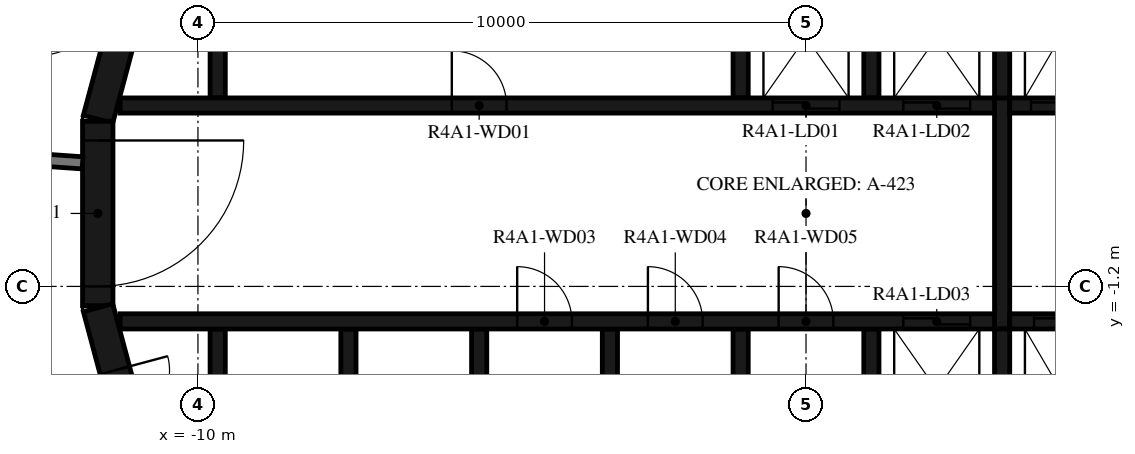
"""IFC4 building model, lengths in metres.
Left out: names, types, materials, properties, quantities, classifications, styles, units other than length and angle.
Written with IfcOpenShell. Run it as: python <this file> out.ifc"""

import sys

from ifc_helpers import new_model, si_unit, direction, frame, frame_2d, origin, place, context, subcontext, project, spatial, polyline, rectangle, outline, extrude, element, fill, save


model = new_model("IFC4")
c1 = context("Model", 3, precision=1e-05, world=origin(), true_north=direction((0.0, 1.0)))
c2 = subcontext(c1, "Body", "Model", "MODEL_VIEW")
j1 = project(units=[si_unit("LENGTHUNIT", "METRE"), si_unit("PLANEANGLEUNIT", "RADIAN")], contexts=[c1])
p1 = place(None, origin())
s1 = spatial("IfcSite", under=j1, at=p1, CompositionType="ELEMENT")
p2 = place(p1, origin())
s2 = spatial("IfcBuilding", under=s1, at=p2, CompositionType="ELEMENT")
p3 = place(p2, frame((0.0, 0.0, 155.2)))
s3 = spatial("IfcBuildingStorey", under=s2, at=p3, CompositionType="ELEMENT", Elevation=155.2)
p4 = place(p3, frame((-10.858, 4.479, 0.0), z_axis=(0.0, 0.0, 1.0), x_axis=(-0.258734743916, -0.965948410781, 0.0)))
e1 = element("IfcWall", 1, at=p4, inside=s3, PredefinedType="SHEAR", context=c2, shape_type="SweptSolid", body=[
    extrude(rectangle(XDim=3.033, YDim=0.5, at=frame_2d((1.516, 0.0))), origin(), (0.0, 0.0, 1.0), 3.12),
])
p5 = place(p3, frame((-11.647, 1.516, 0.0), z_axis=(0.0, 0.0, 1.0), x_axis=(0.0, -1.0, 0.0)))
e2 = element("IfcWall", 2, at=p5, inside=s3, PredefinedType="SHEAR", context=c2, shape_type="SweptSolid", body=[
    extrude(rectangle(XDim=3.033, YDim=0.5, at=frame_2d((1.516, 0.0))), origin(), (0.0, 0.0, 1.0), 3.12),
])
p6 = place(p5, frame((0.316, 0.0, 0.0)))
e3 = element("IfcOpeningElement", 3, at=p6, cuts=e2, PredefinedType="OPENING", context=c2, shape_type="SweptSolid", body=[
    extrude(rectangle(XDim=2.4, YDim=2.1, at=frame_2d((1.2, 1.05))), frame((0.0, 0.26, 0.0), z_axis=(0.0, -1.0, 0.0), x_axis=(1.0, 0.0, 0.0)), (0.0, 0.0, 1.0), 0.52),
])
p7 = place(p3, frame((-11.643, -1.55, 0.0), z_axis=(0.0, 0.0, 1.0), x_axis=(0.258734743916, -0.965948410781, 0.0)))
e4 = element("IfcWall", 4, at=p7, inside=s3, PredefinedType="SHEAR", context=c2, shape_type="SweptSolid", body=[
    extrude(rectangle(XDim=3.033, YDim=0.5, at=frame_2d((1.516, 0.0))), origin(), (0.0, 0.0, 1.0), 3.12),
])
p8 = place(p7, frame((1.066, 0.0, 0.0)))
e5 = element("IfcOpeningElement", 5, at=p8, cuts=e4, PredefinedType="OPENING", context=c2, shape_type="SweptSolid", body=[
    extrude(rectangle(XDim=0.9, YDim=2.1, at=frame_2d((0.45, 1.05))), frame((0.0, 0.26, 0.0), z_axis=(0.0, -1.0, 0.0), x_axis=(1.0, 0.0, 0.0)), (0.0, 0.0, 1.0), 0.52),
])
p9 = place(p3, origin())
e6 = element("IfcWall", 6, at=p9, inside=s3, PredefinedType="SHEAR", context=c2, shape_type="SweptSolid", body=[
    extrude(outline(polyline([(-9.55, 4.8), (-1.2, 4.8), (-1.2, 1.9), (-0.95, 1.9), (-0.95, 4.8), (0.95, 4.8), (0.95, 1.9), (1.2, 1.9), (1.2, 4.8), (3.1, 4.8), (3.1, 1.9), (3.35, 1.9), (3.35, 4.8), (5.25, 4.8), (5.25, 1.9), (5.5, 1.9), (5.5, 4.8), (7.4, 4.8), (7.4, 1.9), (7.65, 1.9), (7.65, 4.8), (9.55, 4.8), (9.55, 1.9), (9.8, 1.9), (9.8, 4.8), (9.8, 5.05), (-9.8, 5.05), (-9.8, 4.8), (-9.8, 1.9), (-9.55, 1.9), (-9.55, 4.8)])), origin(), (0.0, 0.0, 1.0), 3.12),
])
p10 = place(p3, origin())
e7 = element("IfcWall", 7, at=p10, inside=s3, PredefinedType="SHEAR", context=c2, shape_type="SweptSolid", body=[
    extrude(outline(polyline([(9.8, -5.05), (9.8, -4.8), (9.8, -1.9), (9.55, -1.9), (9.55, -4.8), (7.65, -4.8), (7.65, -1.9), (7.4, -1.9), (7.4, -4.8), (5.5, -4.8), (5.5, -1.9), (5.25, -1.9), (5.25, -4.8), (3.35, -4.8), (3.35, -1.9), (3.1, -1.9), (3.1, -4.8), (1.2, -4.8), (1.2, -1.9), (0.95, -1.9), (0.95, -4.8), (-0.95, -4.8), (-0.95, -1.9), (-1.2, -1.9), (-1.2, -4.8), (-3.1, -4.8), (-3.1, -1.9), (-3.35, -1.9), (-3.35, -4.8), (-5.25, -4.8), (-5.25, -1.9), (-5.5, -1.9), (-5.5, -4.8), (-7.4, -4.8), (-7.4, -1.9), (-7.65, -1.9), (-7.65, -4.8), (-9.55, -4.8), (-9.55, -1.9), (-9.8, -1.9), (-9.8, -4.8), (-9.8, -5.05), (9.8, -5.05)])), origin(), (0.0, 0.0, 1.0), 3.12),
])
p11 = place(p3, frame((-11.28, 1.775, 0.0), z_axis=(0.0, 0.0, 1.0), x_axis=(1.0, 0.0, 0.0)))
e8 = element("IfcWall", 8, at=p11, inside=s3, PredefinedType="SHEAR", context=c2, shape_type="SweptSolid", body=[
    extrude(rectangle(XDim=14.38, YDim=0.25, at=frame_2d((7.19, 0.0))), origin(), (0.0, 0.0, 1.0), 3.12),
])
p12 = place(p11, frame((10.73, 0.0, 0.0)))
e9 = element("IfcOpeningElement", 9, at=p12, cuts=e8, PredefinedType="OPENING", context=c2, shape_type="SweptSolid", body=[
    extrude(rectangle(XDim=1.1, YDim=2.1, at=frame_2d((0.55, 1.05))), frame((0.0, 0.135, 0.0), z_axis=(0.0, -1.0, 0.0), x_axis=(1.0, 0.0, 0.0)), (0.0, 0.0, 1.0), 0.27),
])
p13 = place(p11, frame((12.88, 0.0, 0.0)))
e10 = element("IfcOpeningElement", 10, at=p13, cuts=e8, PredefinedType="OPENING", context=c2, shape_type="SweptSolid", body=[
    extrude(rectangle(XDim=1.1, YDim=2.1, at=frame_2d((0.55, 1.05))), frame((0.0, 0.135, 0.0), z_axis=(0.0, -1.0, 0.0), x_axis=(1.0, 0.0, 0.0)), (0.0, 0.0, 1.0), 0.27),
])
p14 = place(p11, frame((5.455, 0.0, 0.0)))
e11 = element("IfcOpeningElement", 11, at=p14, cuts=e8, PredefinedType="OPENING", context=c2, shape_type="SweptSolid", body=[
    extrude(rectangle(XDim=0.9, YDim=2.1, at=frame_2d((0.45, 1.05))), frame((0.0, 0.135, 0.0), z_axis=(0.0, -1.0, 0.0), x_axis=(1.0, 0.0, 0.0)), (0.0, 0.0, 1.0), 0.27),
])
p15 = place(p3, frame((3.35, 1.775, 0.0), z_axis=(0.0, 0.0, 1.0), x_axis=(1.0, 0.0, 0.0)))
e12 = element("IfcWall", 12, at=p15, inside=s3, PredefinedType="SHEAR", context=c2, shape_type="SweptSolid", body=[
    extrude(rectangle(XDim=7.93, YDim=0.25, at=frame_2d((3.965, 0.0))), origin(), (0.0, 0.0, 1.0), 3.12),
])
p16 = place(p15, frame((0.35, 0.0, 0.0)))
e13 = element("IfcOpeningElement", 13, at=p16, cuts=e12, PredefinedType="OPENING", context=c2, shape_type="SweptSolid", body=[
    extrude(rectangle(XDim=1.2, YDim=2.4, at=frame_2d((0.6, 1.2))), frame((0.0, 0.135, 0.0), z_axis=(0.0, -1.0, 0.0), x_axis=(1.0, 0.0, 0.0)), (0.0, 0.0, 1.0), 0.27),
])
p17 = place(p15, frame((2.5, 0.0, 0.0)))
e14 = element("IfcOpeningElement", 14, at=p17, cuts=e12, PredefinedType="OPENING", context=c2, shape_type="SweptSolid", body=[
    extrude(rectangle(XDim=1.2, YDim=2.4, at=frame_2d((0.6, 1.2))), frame((0.0, 0.135, 0.0), z_axis=(0.0, -1.0, 0.0), x_axis=(1.0, 0.0, 0.0)), (0.0, 0.0, 1.0), 0.27),
])
p18 = place(p15, frame((4.8, 0.0, 0.0)))
e15 = element("IfcOpeningElement", 15, at=p18, cuts=e12, PredefinedType="OPENING", context=c2, shape_type="SweptSolid", body=[
    extrude(rectangle(XDim=0.9, YDim=2.1, at=frame_2d((0.45, 1.05))), frame((0.0, 0.135, 0.0), z_axis=(0.0, -1.0, 0.0), x_axis=(1.0, 0.0, 0.0)), (0.0, 0.0, 1.0), 0.27),
])
p19 = place(p3, frame((-11.28, -1.775, 0.0), z_axis=(0.0, 0.0, 1.0), x_axis=(1.0, 0.0, 0.0)))
e16 = element("IfcWall", 16, at=p19, inside=s3, PredefinedType="SHEAR", context=c2, shape_type="SweptSolid", body=[
    extrude(rectangle(XDim=14.38, YDim=0.25, at=frame_2d((7.19, 0.0))), origin(), (0.0, 0.0, 1.0), 3.12),
])
p20 = place(p19, frame((12.88, 0.0, 0.0)))
e17 = element("IfcOpeningElement", 17, at=p20, cuts=e16, PredefinedType="OPENING", context=c2, shape_type="SweptSolid", body=[
    extrude(rectangle(XDim=1.1, YDim=2.1, at=frame_2d((0.55, 1.05))), frame((0.0, 0.135, 0.0), z_axis=(0.0, -1.0, 0.0), x_axis=(1.0, 0.0, 0.0)), (0.0, 0.0, 1.0), 0.27),
])
p21 = place(p19, frame((6.53, 0.0, 0.0)))
e18 = element("IfcOpeningElement", 18, at=p21, cuts=e16, PredefinedType="OPENING", context=c2, shape_type="SweptSolid", body=[
    extrude(rectangle(XDim=0.9, YDim=2.1, at=frame_2d((0.45, 1.05))), frame((0.0, 0.135, 0.0), z_axis=(0.0, -1.0, 0.0), x_axis=(1.0, 0.0, 0.0)), (0.0, 0.0, 1.0), 0.27),
])
p22 = place(p19, frame((8.68, 0.0, 0.0)))
e19 = element("IfcOpeningElement", 19, at=p22, cuts=e16, PredefinedType="OPENING", context=c2, shape_type="SweptSolid", body=[
    extrude(rectangle(XDim=0.9, YDim=2.1, at=frame_2d((0.45, 1.05))), frame((0.0, 0.135, 0.0), z_axis=(0.0, -1.0, 0.0), x_axis=(1.0, 0.0, 0.0)), (0.0, 0.0, 1.0), 0.27),
])
p23 = place(p19, frame((10.83, 0.0, 0.0)))
e20 = element("IfcOpeningElement", 20, at=p23, cuts=e16, PredefinedType="OPENING", context=c2, shape_type="SweptSolid", body=[
    extrude(rectangle(XDim=0.9, YDim=2.1, at=frame_2d((0.45, 1.05))), frame((0.0, 0.135, 0.0), z_axis=(0.0, -1.0, 0.0), x_axis=(1.0, 0.0, 0.0)), (0.0, 0.0, 1.0), 0.27),
])
p24 = place(p3, frame((3.35, -1.775, 0.0), z_axis=(0.0, 0.0, 1.0), x_axis=(1.0, 0.0, 0.0)))
e21 = element("IfcWall", 21, at=p24, inside=s3, PredefinedType="SHEAR", context=c2, shape_type="SweptSolid", body=[
    extrude(rectangle(XDim=7.93, YDim=0.25, at=frame_2d((3.965, 0.0))), origin(), (0.0, 0.0, 1.0), 3.12),
])
p25 = place(p24, frame((0.4, 0.0, 0.0)))
e22 = element("IfcOpeningElement", 22, at=p25, cuts=e21, PredefinedType="OPENING", context=c2, shape_type="SweptSolid", body=[
    extrude(rectangle(XDim=1.1, YDim=2.4, at=frame_2d((0.55, 1.2))), frame((0.0, 0.135, 0.0), z_axis=(0.0, -1.0, 0.0), x_axis=(1.0, 0.0, 0.0)), (0.0, 0.0, 1.0), 0.27),
])
p26 = place(p24, frame((2.55, 0.0, 0.0)))
e23 = element("IfcOpeningElement", 23, at=p26, cuts=e21, PredefinedType="OPENING", context=c2, shape_type="SweptSolid", body=[
    extrude(rectangle(XDim=1.1, YDim=2.4, at=frame_2d((0.55, 1.2))), frame((0.0, 0.135, 0.0), z_axis=(0.0, -1.0, 0.0), x_axis=(1.0, 0.0, 0.0)), (0.0, 0.0, 1.0), 0.27),
])
p27 = place(p24, frame((4.7, 0.0, 0.0)))
e24 = element("IfcOpeningElement", 24, at=p27, cuts=e21, PredefinedType="OPENING", context=c2, shape_type="SweptSolid", body=[
    extrude(rectangle(XDim=1.1, YDim=2.4, at=frame_2d((0.55, 1.2))), frame((0.0, 0.135, 0.0), z_axis=(0.0, -1.0, 0.0), x_axis=(1.0, 0.0, 0.0)), (0.0, 0.0, 1.0), 0.27),
])
p28 = place(p3, frame((3.225, -1.9, 0.0), z_axis=(0.0, 0.0, 1.0), x_axis=(0.0, 1.0, 0.0)))
e25 = element("IfcWall", 25, at=p28, inside=s3, PredefinedType="SHEAR", context=c2, shape_type="SweptSolid", body=[
    extrude(rectangle(XDim=3.8, YDim=0.25, at=frame_2d((1.9, 0.0))), origin(), (0.0, 0.0, 1.0), 3.12),
])
p29 = place(p3, frame((-13.454, 0.941, 0.0), z_axis=(0.0, 0.0, 1.0), x_axis=(0.99755155062, -0.069934997354, 0.0)))
e26 = element("IfcWall", 26, at=p29, inside=s3, PredefinedType="STANDARD", context=c2, shape_type="SweptSolid", body=[
    extrude(rectangle(XDim=1.561, YDim=0.2, at=frame_2d((0.78, 0.0))), origin(), (0.0, 0.0, 1.0), 3.12),
])
p30 = place(p6, origin())
e27 = element("IfcDoor", 27, at=p30, inside=s3, OperationType="DOUBLE_DOOR_SINGLE_SWING", PredefinedType="DOOR", context=c2, shape_type="SweptSolid", body=[
    extrude(rectangle(XDim=2.4, YDim=2.1, at=frame_2d((1.2, 1.05))), frame((0.0, 0.025, 0.0), z_axis=(0.0, -1.0, 0.0), x_axis=(1.0, 0.0, 0.0)), (0.0, 0.0, 1.0), 0.05),
])
fill(e3, e27)
p31 = place(p12, origin())
e28 = element("IfcDoor", 28, at=p31, inside=s3, OperationType="DOUBLE_DOOR_SLIDING", PredefinedType="DOOR", context=c2, shape_type="SweptSolid", body=[
    extrude(rectangle(XDim=1.1, YDim=2.1, at=frame_2d((0.55, 1.05))), frame((0.0, 0.025, 0.0), z_axis=(0.0, -1.0, 0.0), x_axis=(1.0, 0.0, 0.0)), (0.0, 0.0, 1.0), 0.05),
])
fill(e9, e28)
p32 = place(p13, origin())
e29 = element("IfcDoor", 29, at=p32, inside=s3, OperationType="DOUBLE_DOOR_SLIDING", PredefinedType="DOOR", context=c2, shape_type="SweptSolid", body=[
    extrude(rectangle(XDim=1.1, YDim=2.1, at=frame_2d((0.55, 1.05))), frame((0.0, 0.025, 0.0), z_axis=(0.0, -1.0, 0.0), x_axis=(1.0, 0.0, 0.0)), (0.0, 0.0, 1.0), 0.05),
])
fill(e10, e29)
p33 = place(p16, origin())
e30 = element("IfcDoor", 30, at=p33, inside=s3, OperationType="DOUBLE_DOOR_SLIDING", PredefinedType="DOOR", context=c2, shape_type="SweptSolid", body=[
    extrude(rectangle(XDim=1.2, YDim=2.4, at=frame_2d((0.6, 1.2))), frame((0.0, 0.025, 0.0), z_axis=(0.0, -1.0, 0.0), x_axis=(1.0, 0.0, 0.0)), (0.0, 0.0, 1.0), 0.05),
])
fill(e13, e30)
p34 = place(p20, origin())
e31 = element("IfcDoor", 31, at=p34, inside=s3, OperationType="DOUBLE_DOOR_SLIDING", PredefinedType="DOOR", context=c2, shape_type="SweptSolid", body=[
    extrude(rectangle(XDim=1.1, YDim=2.1, at=frame_2d((0.55, 1.05))), frame((0.0, 0.025, 0.0), z_axis=(0.0, -1.0, 0.0), x_axis=(1.0, 0.0, 0.0)), (0.0, 0.0, 1.0), 0.05),
])
fill(e17, e31)
p35 = place(p25, origin())
e32 = element("IfcDoor", 32, at=p35, inside=s3, OperationType="DOUBLE_DOOR_SLIDING", PredefinedType="DOOR", context=c2, shape_type="SweptSolid", body=[
    extrude(rectangle(XDim=1.1, YDim=2.4, at=frame_2d((0.55, 1.2))), frame((0.0, 0.025, 0.0), z_axis=(0.0, -1.0, 0.0), x_axis=(1.0, 0.0, 0.0)), (0.0, 0.0, 1.0), 0.05),
])
fill(e22, e32)
p36 = place(p14, origin())
e33 = element("IfcDoor", 33, at=p36, inside=s3, OperationType="SINGLE_SWING_LEFT", PredefinedType="DOOR", context=c2, shape_type="SweptSolid", body=[
    extrude(rectangle(XDim=0.9, YDim=2.1, at=frame_2d((0.45, 1.05))), frame((0.0, 0.025, 0.0), z_axis=(0.0, -1.0, 0.0), x_axis=(1.0, 0.0, 0.0)), (0.0, 0.0, 1.0), 0.05),
])
fill(e11, e33)
p37 = place(p21, origin())
e34 = element("IfcDoor", 34, at=p37, inside=s3, OperationType="SINGLE_SWING_LEFT", PredefinedType="DOOR", context=c2, shape_type="SweptSolid", body=[
    extrude(rectangle(XDim=0.9, YDim=2.1, at=frame_2d((0.45, 1.05))), frame((0.0, 0.025, 0.0), z_axis=(0.0, -1.0, 0.0), x_axis=(1.0, 0.0, 0.0)), (0.0, 0.0, 1.0), 0.05),
])
fill(e18, e34)
p38 = place(p22, origin())
e35 = element("IfcDoor", 35, at=p38, inside=s3, OperationType="SINGLE_SWING_RIGHT", PredefinedType="DOOR", context=c2, shape_type="SweptSolid", body=[
    extrude(rectangle(XDim=0.9, YDim=2.1, at=frame_2d((0.45, 1.05))), frame((0.0, 0.025, 0.0), z_axis=(0.0, -1.0, 0.0), x_axis=(1.0, 0.0, 0.0)), (0.0, 0.0, 1.0), 0.05),
])
fill(e19, e35)
p39 = place(p23, origin())
e36 = element("IfcDoor", 36, at=p39, inside=s3, OperationType="SINGLE_SWING_LEFT", PredefinedType="DOOR", context=c2, shape_type="SweptSolid", body=[
    extrude(rectangle(XDim=0.9, YDim=2.1, at=frame_2d((0.45, 1.05))), frame((0.0, 0.025, 0.0), z_axis=(0.0, -1.0, 0.0), x_axis=(1.0, 0.0, 0.0)), (0.0, 0.0, 1.0), 0.05),
])
fill(e20, e36)
p40 = place(p8, origin())
e37 = element("IfcDoor", 37, at=p40, inside=s3, OperationType="SINGLE_SWING_RIGHT", PredefinedType="DOOR", context=c2, shape_type="SweptSolid", body=[
    extrude(rectangle(XDim=0.9, YDim=2.1, at=frame_2d((0.45, 1.05))), frame((0.0, 0.025, 0.0), z_axis=(0.0, -1.0, 0.0), x_axis=(1.0, 0.0, 0.0)), (0.0, 0.0, 1.0), 0.05),
])
fill(e5, e37)
save(model, sys.argv[1])
